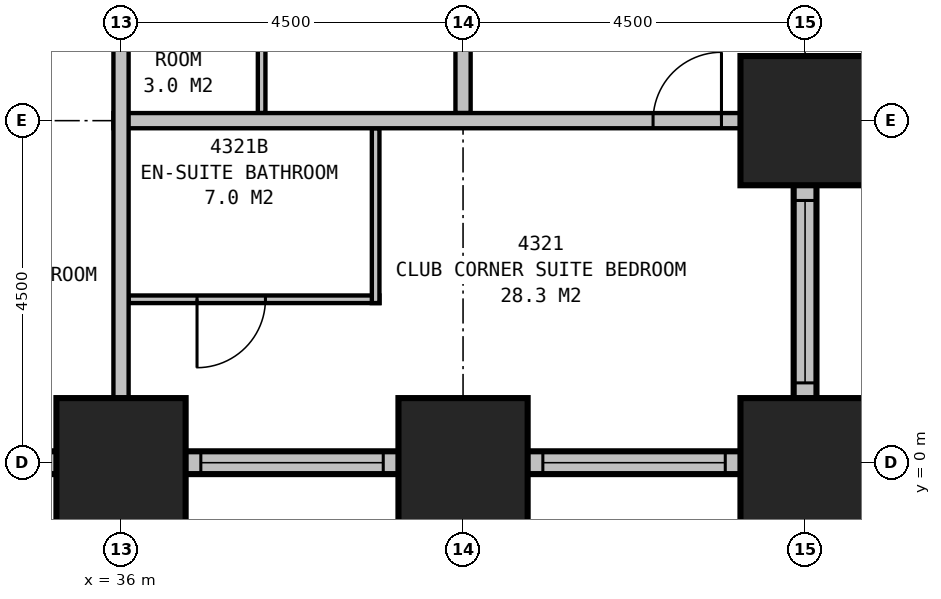
"""IFC4 building model, lengths in metres.
Left out: names, types, materials, properties, quantities, classifications, styles, units other than length and angle.
Written with IfcOpenShell. Run it as: python <this file> out.ifc"""

import sys

from ifc_helpers import new_model, si_unit, direction, frame, frame_2d, origin, origin_2d, place, context, subcontext, project, spatial, rectangle, extrude, element, fill, save


model = new_model("IFC4")
c1 = context("Model", 3, precision=1e-05, world=origin(), true_north=direction((0.0, 1.0)))
c2 = subcontext(c1, "Body", "Model", "MODEL_VIEW")
j1 = project(units=[si_unit("LENGTHUNIT", "METRE"), si_unit("PLANEANGLEUNIT", "RADIAN")], contexts=[c1])
p1 = place(None, origin())
s1 = spatial("IfcSite", under=j1, at=p1, CompositionType="ELEMENT")
p2 = place(p1, origin())
s2 = spatial("IfcBuilding", under=s1, at=p2, CompositionType="ELEMENT")
p3 = place(p2, frame((0.0, 0.0, 169.4)))
s3 = spatial("IfcBuildingStorey", under=s2, at=p3, CompositionType="ELEMENT", Elevation=169.4)
for number, where, z_axis, x_axis in (
    (1, (36.0, 0.0, 0.0), (0.0, 0.0, 1.0), (1.0, 0.0, 0.0)),
    (2, (40.5, 0.0, 0.0), (0.0, 0.0, 1.0), (1.0, 0.0, 0.0)),
    (3, (45.0, 0.0, 0.0), (0.0, 0.0, 1.0), (1.0, 0.0, 0.0)),
    (4, (45.0, 4.5, 0.0), (0.0, 0.0, 1.0), (1.0, 0.0, 0.0)),
):
    element("IfcColumn", number, at=place(p3, frame(where, z_axis=z_axis, x_axis=x_axis)), inside=s3, PredefinedType="COLUMN", context=c2, shape_type="SweptSolid", body=[
        extrude(rectangle(XDim=1.7, YDim=1.7, at=origin_2d()), origin(), (0.0, 0.0, 1.0), 3.5),
    ])
p4 = place(p3, frame((8.85, 0.0, 0.0), z_axis=(0.0, 0.0, 1.0), x_axis=(1.0, 0.0, 0.0)))
e5 = element("IfcWall", 5, at=p4, inside=s3, PredefinedType="STANDARD", context=c2, shape_type="SweptSolid", body=[
    extrude(rectangle(XDim=36.3, YDim=0.3, at=frame_2d((18.15, 0.0))), origin(), (0.0, 0.0, 1.0), 2.25),
])
p5 = place(p4, frame((1.2, 0.0, 0.5)))
e6 = element("IfcOpeningElement", 6, at=p5, cuts=e5, PredefinedType="OPENING", context=c2, shape_type="SweptSolid", body=[
    extrude(rectangle(XDim=2.4, YDim=1.6, at=frame_2d((1.2, 0.8))), frame((0.0, 0.16, 0.0), z_axis=(0.0, -1.0, 0.0), x_axis=(1.0, 0.0, 0.0)), (0.0, 0.0, 1.0), 0.32),
])
p6 = place(p4, frame((5.7, 0.0, 0.5)))
e7 = element("IfcOpeningElement", 7, at=p6, cuts=e5, PredefinedType="OPENING", context=c2, shape_type="SweptSolid", body=[
    extrude(rectangle(XDim=2.4, YDim=1.6, at=frame_2d((1.2, 0.8))), frame((0.0, 0.16, 0.0), z_axis=(0.0, -1.0, 0.0), x_axis=(1.0, 0.0, 0.0)), (0.0, 0.0, 1.0), 0.32),
])
p7 = place(p4, frame((10.2, 0.0, 0.5)))
e8 = element("IfcOpeningElement", 8, at=p7, cuts=e5, PredefinedType="OPENING", context=c2, shape_type="SweptSolid", body=[
    extrude(rectangle(XDim=2.4, YDim=1.6, at=frame_2d((1.2, 0.8))), frame((0.0, 0.16, 0.0), z_axis=(0.0, -1.0, 0.0), x_axis=(1.0, 0.0, 0.0)), (0.0, 0.0, 1.0), 0.32),
])
p8 = place(p4, frame((14.7, 0.0, 0.5)))
e9 = element("IfcOpeningElement", 9, at=p8, cuts=e5, PredefinedType="OPENING", context=c2, shape_type="SweptSolid", body=[
    extrude(rectangle(XDim=2.4, YDim=1.6, at=frame_2d((1.2, 0.8))), frame((0.0, 0.16, 0.0), z_axis=(0.0, -1.0, 0.0), x_axis=(1.0, 0.0, 0.0)), (0.0, 0.0, 1.0), 0.32),
])
p9 = place(p4, frame((19.2, 0.0, 0.5)))
e10 = element("IfcOpeningElement", 10, at=p9, cuts=e5, PredefinedType="OPENING", context=c2, shape_type="SweptSolid", body=[
    extrude(rectangle(XDim=2.4, YDim=1.6, at=frame_2d((1.2, 0.8))), frame((0.0, 0.16, 0.0), z_axis=(0.0, -1.0, 0.0), x_axis=(1.0, 0.0, 0.0)), (0.0, 0.0, 1.0), 0.32),
])
p10 = place(p4, frame((23.7, 0.0, 0.5)))
e11 = element("IfcOpeningElement", 11, at=p10, cuts=e5, PredefinedType="OPENING", context=c2, shape_type="SweptSolid", body=[
    extrude(rectangle(XDim=2.4, YDim=1.6, at=frame_2d((1.2, 0.8))), frame((0.0, 0.16, 0.0), z_axis=(0.0, -1.0, 0.0), x_axis=(1.0, 0.0, 0.0)), (0.0, 0.0, 1.0), 0.32),
])
p11 = place(p4, frame((28.2, 0.0, 0.5)))
e12 = element("IfcOpeningElement", 12, at=p11, cuts=e5, PredefinedType="OPENING", context=c2, shape_type="SweptSolid", body=[
    extrude(rectangle(XDim=2.4, YDim=1.6, at=frame_2d((1.2, 0.8))), frame((0.0, 0.16, 0.0), z_axis=(0.0, -1.0, 0.0), x_axis=(1.0, 0.0, 0.0)), (0.0, 0.0, 1.0), 0.32),
])
p12 = place(p4, frame((32.7, 0.0, 0.5)))
e13 = element("IfcOpeningElement", 13, at=p12, cuts=e5, PredefinedType="OPENING", context=c2, shape_type="SweptSolid", body=[
    extrude(rectangle(XDim=2.4, YDim=1.6, at=frame_2d((1.2, 0.8))), frame((0.0, 0.16, 0.0), z_axis=(0.0, -1.0, 0.0), x_axis=(1.0, 0.0, 0.0)), (0.0, 0.0, 1.0), 0.32),
])
p13 = place(p3, frame((45.0, -0.15, 0.0), z_axis=(0.0, 0.0, 1.0), x_axis=(0.0, 1.0, 0.0)))
e14 = element("IfcWall", 14, at=p13, inside=s3, PredefinedType="STANDARD", context=c2, shape_type="SweptSolid", body=[
    extrude(rectangle(XDim=4.8, YDim=0.3, at=frame_2d((2.4, 0.0))), origin(), (0.0, 0.0, 1.0), 2.25),
])
p14 = place(p13, frame((1.2, 0.0, 0.5)))
e15 = element("IfcOpeningElement", 15, at=p14, cuts=e14, PredefinedType="OPENING", context=c2, shape_type="SweptSolid", body=[
    extrude(rectangle(XDim=2.4, YDim=1.6, at=frame_2d((1.2, 0.8))), frame((0.0, 0.16, 0.0), z_axis=(0.0, -1.0, 0.0), x_axis=(1.0, 0.0, 0.0)), (0.0, 0.0, 1.0), 0.32),
])
p15 = place(p3, frame((44.85, 4.5, 0.0), z_axis=(0.0, 0.0, 1.0), x_axis=(1.0, 0.0, 0.0)))
e16 = element("IfcWall", 16, at=p15, inside=s3, PredefinedType="STANDARD", context=c2, shape_type="SweptSolid", body=[
    extrude(rectangle(XDim=4.3, YDim=0.3, at=frame_2d((2.15, 0.0))), origin(), (0.0, 0.0, 1.0), 2.25),
])
p16 = place(p15, frame((1.4, 0.0, 0.5)))
e17 = element("IfcOpeningElement", 17, at=p16, cuts=e16, PredefinedType="OPENING", context=c2, shape_type="SweptSolid", body=[
    extrude(rectangle(XDim=1.5, YDim=1.6, at=frame_2d((0.75, 0.8))), frame((0.0, 0.16, 0.0), z_axis=(0.0, -1.0, 0.0), x_axis=(1.0, 0.0, 0.0)), (0.0, 0.0, 1.0), 0.32),
])
p17 = place(p3, frame((49.017, 4.351, 0.0), z_axis=(0.0, 0.0, 1.0), x_axis=(-0.110433201132, 0.993883548555, 0.0)))
e18 = element("IfcWall", 18, at=p17, inside=s3, PredefinedType="STANDARD", context=c2, shape_type="SweptSolid", body=[
    extrude(rectangle(XDim=31.994, YDim=0.3, at=frame_2d((15.997, 0.0))), origin(), (0.0, 0.0, 1.0), 2.25),
])
p18 = place(p17, frame((1.664, 0.0, 0.5)))
e19 = element("IfcOpeningElement", 19, at=p18, cuts=e18, PredefinedType="OPENING", context=c2, shape_type="SweptSolid", body=[
    extrude(rectangle(XDim=1.5, YDim=1.6, at=frame_2d((0.75, 0.8))), frame((0.0, 0.16, 0.0), z_axis=(0.0, -1.0, 0.0), x_axis=(1.0, 0.0, 0.0)), (0.0, 0.0, 1.0), 0.32),
])
p19 = place(p17, frame((6.192, 0.0, 0.5)))
e20 = element("IfcOpeningElement", 20, at=p19, cuts=e18, PredefinedType="OPENING", context=c2, shape_type="SweptSolid", body=[
    extrude(rectangle(XDim=1.5, YDim=1.6, at=frame_2d((0.75, 0.8))), frame((0.0, 0.16, 0.0), z_axis=(0.0, -1.0, 0.0), x_axis=(1.0, 0.0, 0.0)), (0.0, 0.0, 1.0), 0.32),
])
p20 = place(p17, frame((10.719, 0.0, 0.5)))
e21 = element("IfcOpeningElement", 21, at=p20, cuts=e18, PredefinedType="OPENING", context=c2, shape_type="SweptSolid", body=[
    extrude(rectangle(XDim=1.5, YDim=1.6, at=frame_2d((0.75, 0.8))), frame((0.0, 0.16, 0.0), z_axis=(0.0, -1.0, 0.0), x_axis=(1.0, 0.0, 0.0)), (0.0, 0.0, 1.0), 0.32),
])
p21 = place(p17, frame((15.247, 0.0, 0.5)))
e22 = element("IfcOpeningElement", 22, at=p21, cuts=e18, PredefinedType="OPENING", context=c2, shape_type="SweptSolid", body=[
    extrude(rectangle(XDim=1.5, YDim=1.6, at=frame_2d((0.75, 0.8))), frame((0.0, 0.16, 0.0), z_axis=(0.0, -1.0, 0.0), x_axis=(1.0, 0.0, 0.0)), (0.0, 0.0, 1.0), 0.32),
])
p22 = place(p17, frame((19.775, 0.0, 0.5)))
e23 = element("IfcOpeningElement", 23, at=p22, cuts=e18, PredefinedType="OPENING", context=c2, shape_type="SweptSolid", body=[
    extrude(rectangle(XDim=1.5, YDim=1.6, at=frame_2d((0.75, 0.8))), frame((0.0, 0.16, 0.0), z_axis=(0.0, -1.0, 0.0), x_axis=(1.0, 0.0, 0.0)), (0.0, 0.0, 1.0), 0.32),
])
p23 = place(p17, frame((24.302, 0.0, 0.5)))
e24 = element("IfcOpeningElement", 24, at=p23, cuts=e18, PredefinedType="OPENING", context=c2, shape_type="SweptSolid", body=[
    extrude(rectangle(XDim=1.5, YDim=1.6, at=frame_2d((0.75, 0.8))), frame((0.0, 0.16, 0.0), z_axis=(0.0, -1.0, 0.0), x_axis=(1.0, 0.0, 0.0)), (0.0, 0.0, 1.0), 0.32),
])
p24 = place(p17, frame((28.83, 0.0, 0.5)))
e25 = element("IfcOpeningElement", 25, at=p24, cuts=e18, PredefinedType="OPENING", context=c2, shape_type="SweptSolid", body=[
    extrude(rectangle(XDim=1.5, YDim=1.6, at=frame_2d((0.75, 0.8))), frame((0.0, 0.16, 0.0), z_axis=(0.0, -1.0, 0.0), x_axis=(1.0, 0.0, 0.0)), (0.0, 0.0, 1.0), 0.32),
])
p25 = place(p3, frame((36.0, 10.6, 0.0), z_axis=(0.0, 0.0, 1.0), x_axis=(0.0, -1.0, 0.0)))
e26 = element("IfcWall", 26, at=p25, inside=s3, PredefinedType="PARTITIONING", context=c2, shape_type="SweptSolid", body=[
    extrude(rectangle(XDim=10.6, YDim=0.2, at=frame_2d((5.3, 0.0))), origin(), (0.0, 0.0, 1.0), 2.25),
])
p26 = place(p3, frame((35.9, 4.5, 0.0), z_axis=(0.0, 0.0, 1.0), x_axis=(1.0, 0.0, 0.0)))
e27 = element("IfcWall", 27, at=p26, inside=s3, PredefinedType="PARTITIONING", context=c2, shape_type="SweptSolid", body=[
    extrude(rectangle(XDim=9.1, YDim=0.2, at=frame_2d((4.55, 0.0))), origin(), (0.0, 0.0, 1.0), 3.25),
])
p27 = place(p26, frame((7.1, 0.0, 0.0)))
e28 = element("IfcOpeningElement", 28, at=p27, cuts=e27, PredefinedType="OPENING", context=c2, shape_type="SweptSolid", body=[
    extrude(rectangle(XDim=0.9, YDim=2.1, at=frame_2d((0.45, 1.05))), frame((0.0, 0.11, 0.0), z_axis=(0.0, -1.0, 0.0), x_axis=(1.0, 0.0, 0.0)), (0.0, 0.0, 1.0), 0.22),
])
p28 = place(p3, frame((40.5, 4.6, 0.0), z_axis=(0.0, 0.0, 1.0), x_axis=(0.0, 1.0, 0.0)))
e29 = element("IfcWall", 29, at=p28, inside=s3, PredefinedType="PARTITIONING", context=c2, shape_type="SweptSolid", body=[
    extrude(rectangle(XDim=8.8, YDim=0.2, at=frame_2d((4.4, 0.0))), origin(), (0.0, 0.0, 1.0), 2.25),
])
p29 = place(p28, frame((4.05, 0.0, 0.0)))
e30 = element("IfcOpeningElement", 30, at=p29, cuts=e29, PredefinedType="OPENING", context=c2, shape_type="SweptSolid", body=[
    extrude(rectangle(XDim=0.9, YDim=2.1, at=frame_2d((0.45, 1.05))), frame((0.0, 0.11, 0.0), z_axis=(0.0, -1.0, 0.0), x_axis=(1.0, 0.0, 0.0)), (0.0, 0.0, 1.0), 0.22),
])
p30 = place(p3, frame((37.85, 4.6, 0.0), z_axis=(0.0, 0.0, 1.0), x_axis=(0.0, 1.0, 0.0)))
e31 = element("IfcWall", 31, at=p30, inside=s3, PredefinedType="PLUMBINGWALL", context=c2, shape_type="SweptSolid", body=[
    extrude(rectangle(XDim=2.0, YDim=0.1, at=frame_2d((1.0, 0.0))), origin(), (0.0, 0.0, 1.0), 3.25),
])
p31 = place(p3, frame((39.35, 4.4, 0.0), z_axis=(0.0, 0.0, 1.0), x_axis=(0.0, -1.0, 0.0)))
e32 = element("IfcWall", 32, at=p31, inside=s3, PredefinedType="PLUMBINGWALL", context=c2, shape_type="SweptSolid", body=[
    extrude(rectangle(XDim=2.3, YDim=0.1, at=frame_2d((1.15, 0.0))), origin(), (0.0, 0.0, 1.0), 3.25),
])
p32 = place(p3, frame((36.1, 2.15, 0.0), z_axis=(0.0, 0.0, 1.0), x_axis=(1.0, 0.0, 0.0)))
e33 = element("IfcWall", 33, at=p32, inside=s3, PredefinedType="PLUMBINGWALL", context=c2, shape_type="SweptSolid", body=[
    extrude(rectangle(XDim=3.3, YDim=0.1, at=frame_2d((1.65, 0.0))), origin(), (0.0, 0.0, 1.0), 3.25),
])
p33 = place(p32, frame((1.8, 0.0, 0.0), z_axis=(0.0, 0.0, 1.0), x_axis=(-1.0, 0.0, 0.0)))
e34 = element("IfcOpeningElement", 34, at=p33, cuts=e33, PredefinedType="OPENING", context=c2, shape_type="SweptSolid", body=[
    extrude(rectangle(XDim=0.9, YDim=2.1, at=frame_2d((0.45, 1.05))), frame((0.0, 0.06, 0.0), z_axis=(0.0, -1.0, 0.0), x_axis=(1.0, 0.0, 0.0)), (0.0, 0.0, 1.0), 0.12),
])
p34 = place(p11, origin())
e35 = element("IfcWindow", 35, at=p34, inside=s3, PartitioningType="SINGLE_PANEL", PredefinedType="WINDOW", context=c2, shape_type="SweptSolid", body=[
    extrude(rectangle(XDim=2.4, YDim=1.6, at=frame_2d((1.2, 0.8))), frame((0.0, 0.03, 0.0), z_axis=(0.0, -1.0, 0.0), x_axis=(1.0, 0.0, 0.0)), (0.0, 0.0, 1.0), 0.06),
])
fill(e12, e35)
p35 = place(p12, origin())
e36 = element("IfcWindow", 36, at=p35, inside=s3, PartitioningType="SINGLE_PANEL", PredefinedType="WINDOW", context=c2, shape_type="SweptSolid", body=[
    extrude(rectangle(XDim=2.4, YDim=1.6, at=frame_2d((1.2, 0.8))), frame((0.0, 0.03, 0.0), z_axis=(0.0, -1.0, 0.0), x_axis=(1.0, 0.0, 0.0)), (0.0, 0.0, 1.0), 0.06),
])
fill(e13, e36)
p36 = place(p14, origin())
e37 = element("IfcWindow", 37, at=p36, inside=s3, PartitioningType="SINGLE_PANEL", PredefinedType="WINDOW", context=c2, shape_type="SweptSolid", body=[
    extrude(rectangle(XDim=2.4, YDim=1.6, at=frame_2d((1.2, 0.8))), frame((0.0, 0.03, 0.0), z_axis=(0.0, -1.0, 0.0), x_axis=(1.0, 0.0, 0.0)), (0.0, 0.0, 1.0), 0.06),
])
fill(e15, e37)
p37 = place(p27, origin())
e38 = element("IfcDoor", 38, at=p37, inside=s3, OperationType="SINGLE_SWING_RIGHT", PredefinedType="DOOR", context=c2, shape_type="SweptSolid", body=[
    extrude(rectangle(XDim=0.9, YDim=2.1, at=frame_2d((0.45, 1.05))), frame((0.0, 0.025, 0.0), z_axis=(0.0, -1.0, 0.0), x_axis=(1.0, 0.0, 0.0)), (0.0, 0.0, 1.0), 0.05),
])
fill(e28, e38)
p38 = place(p33, origin())
e39 = element("IfcDoor", 39, at=p38, inside=s3, OperationType="SINGLE_SWING_RIGHT", PredefinedType="DOOR", context=c2, shape_type="SweptSolid", body=[
    extrude(rectangle(XDim=0.9, YDim=2.1, at=frame_2d((0.45, 1.05))), frame((0.0, 0.025, 0.0), z_axis=(0.0, -1.0, 0.0), x_axis=(1.0, 0.0, 0.0)), (0.0, 0.0, 1.0), 0.05),
])
fill(e34, e39)
save(model, sys.argv[1])
